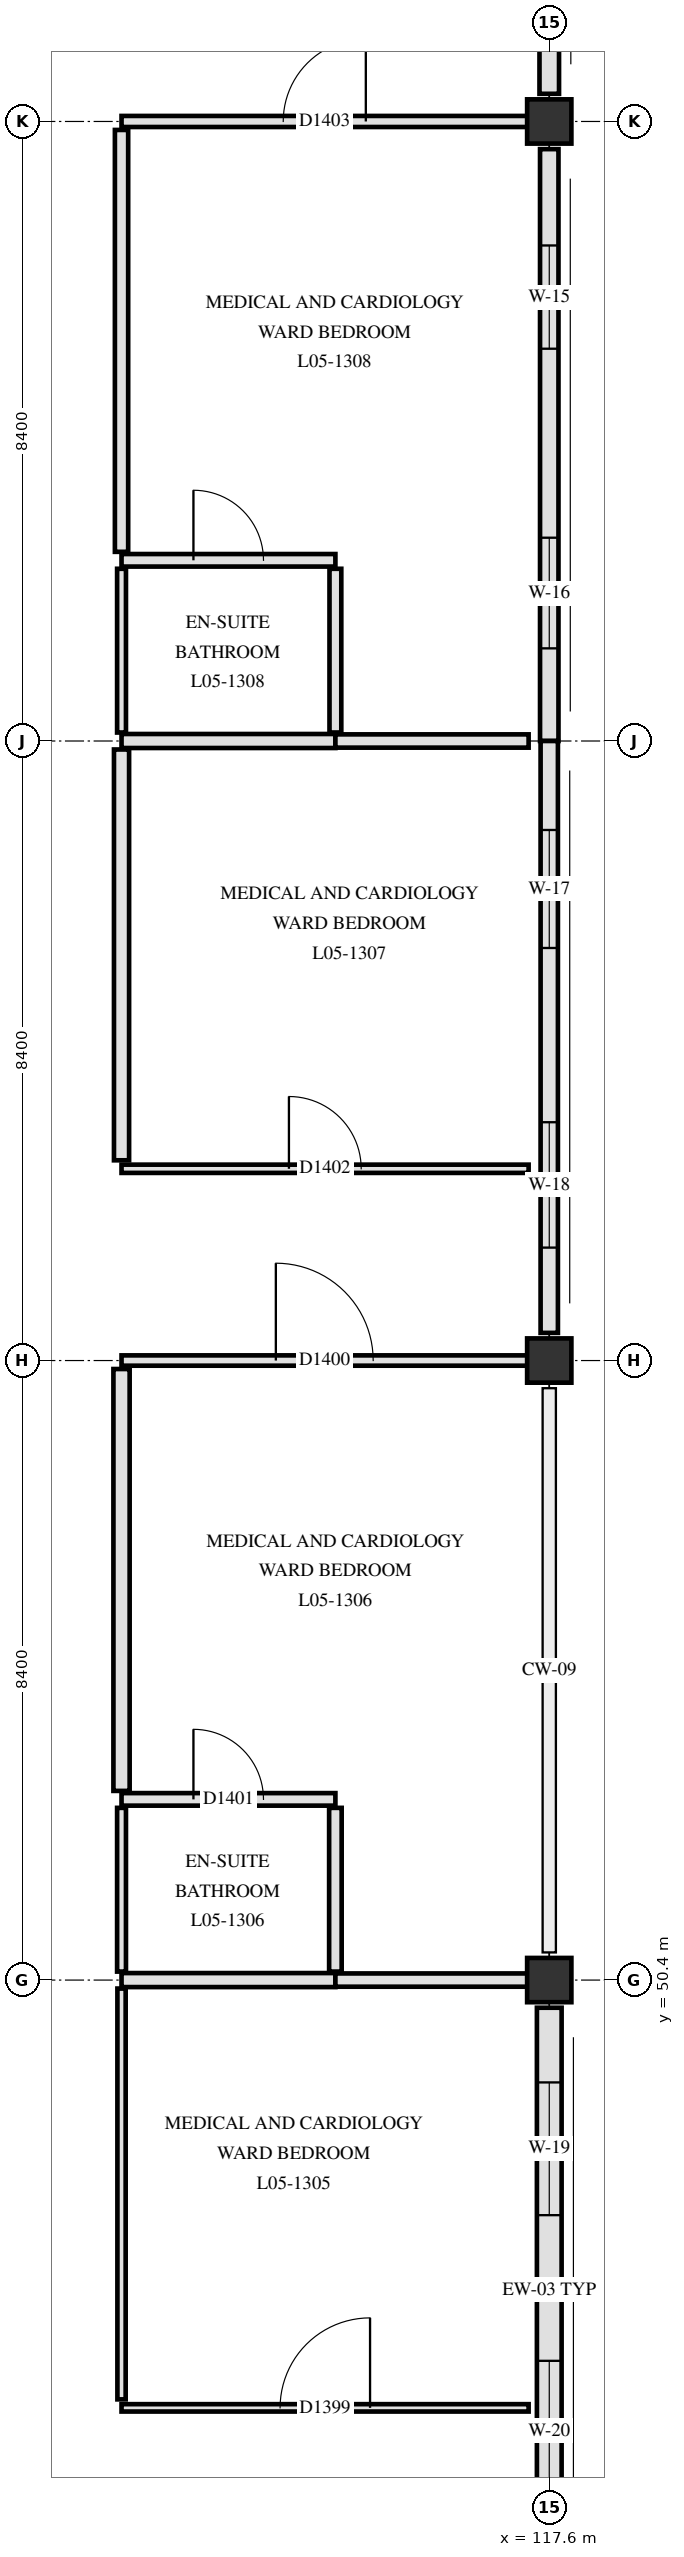
"""IFC4 building model, lengths in metres.
Left out: names, types, materials, properties, quantities, classifications, styles, units other than length and angle.
Written with IfcOpenShell. Run it as: python <this file> out.ifc"""

import sys

from ifc_helpers import new_model, si_unit, direction, frame, frame_2d, origin, origin_2d, place, context, subcontext, project, spatial, rectangle, extrude, element, fill, save


model = new_model("IFC4")
c1 = context("Model", 3, precision=1e-05, world=origin(), true_north=direction((0.0, 1.0)))
c2 = subcontext(c1, "Body", "Model", "MODEL_VIEW")
j1 = project(units=[si_unit("LENGTHUNIT", "METRE"), si_unit("PLANEANGLEUNIT", "RADIAN")], contexts=[c1])
p1 = place(None, origin())
s1 = spatial("IfcSite", under=j1, at=p1, CompositionType="ELEMENT")
p2 = place(p1, origin())
s2 = spatial("IfcBuilding", under=s1, at=p2, CompositionType="ELEMENT")
p3 = place(p2, frame((0.0, 0.0, 22.5)))
s3 = spatial("IfcBuildingStorey", under=s2, at=p3, CompositionType="ELEMENT", Elevation=22.5)
for number, where, z_axis, x_axis in (
    (1, (117.6, 50.4, 0.0), (0.0, 0.0, 1.0), (1.0, 0.0, 0.0)),
    (2, (117.6, 58.8, 0.0), (0.0, 0.0, 1.0), (1.0, 0.0, 0.0)),
    (3, (117.6, 75.6, 0.0), (0.0, 0.0, 1.0), (1.0, 0.0, 0.0)),
):
    element("IfcColumn", number, at=place(p3, frame(where, z_axis=z_axis, x_axis=x_axis)), inside=s3, PredefinedType="COLUMN", context=c2, shape_type="SweptSolid", body=[
        extrude(rectangle(XDim=0.6, YDim=0.6, at=origin_2d()), origin(), (0.0, 0.0, 1.0), 3.9),
    ])
p4 = place(p3, frame((117.6, 83.625, 0.0), z_axis=(0.0, 0.0, 1.0), x_axis=(0.0, -1.0, 0.0)))
e4 = element("IfcWall", 4, at=p4, inside=s3, PredefinedType="SOLIDWALL", context=c2, shape_type="SweptSolid", body=[
    extrude(rectangle(XDim=7.65, YDim=0.265, at=frame_2d((3.825, 0.0))), origin(), (0.0, 0.0, 1.0), 3.38),
])
p5 = place(p4, frame((1.312, 0.0, 0.85)))
e5 = element("IfcOpeningElement", 5, at=p5, cuts=e4, PredefinedType="OPENING", context=c2, shape_type="SweptSolid", body=[
    extrude(rectangle(XDim=1.2, YDim=1.42, at=frame_2d((0.6, 0.71))), frame((0.0, 0.142, 0.0), z_axis=(0.0, -1.0, 0.0), x_axis=(1.0, 0.0, 0.0)), (0.0, 0.0, 1.0), 0.285),
])
p6 = place(p4, frame((5.087, 0.0, 0.85)))
e6 = element("IfcOpeningElement", 6, at=p6, cuts=e4, PredefinedType="OPENING", context=c2, shape_type="SweptSolid", body=[
    extrude(rectangle(XDim=1.3, YDim=1.42, at=frame_2d((0.65, 0.71))), frame((0.0, 0.142, 0.0), z_axis=(0.0, -1.0, 0.0), x_axis=(1.0, 0.0, 0.0)), (0.0, 0.0, 1.0), 0.285),
])
p7 = place(p3, frame((117.6, 75.225, 0.0), z_axis=(0.0, 0.0, 1.0), x_axis=(0.0, -1.0, 0.0)))
e7 = element("IfcWall", 7, at=p7, inside=s3, PredefinedType="SOLIDWALL", context=c2, shape_type="SweptSolid", body=[
    extrude(rectangle(XDim=8.025, YDim=0.25, at=frame_2d((4.013, 0.0))), origin(), (0.0, 0.0, 1.0), 3.11),
])
p8 = place(p7, frame((1.306, 0.0, 0.85)))
e8 = element("IfcOpeningElement", 8, at=p8, cuts=e7, PredefinedType="OPENING", context=c2, shape_type="SweptSolid", body=[
    extrude(rectangle(XDim=1.4, YDim=1.42, at=frame_2d((0.7, 0.71))), frame((0.0, 0.135, 0.0), z_axis=(0.0, -1.0, 0.0), x_axis=(1.0, 0.0, 0.0)), (0.0, 0.0, 1.0), 0.27),
])
p9 = place(p7, frame((5.269, 0.0, 0.85)))
e9 = element("IfcOpeningElement", 9, at=p9, cuts=e7, PredefinedType="OPENING", context=c2, shape_type="SweptSolid", body=[
    extrude(rectangle(XDim=1.5, YDim=1.42, at=frame_2d((0.75, 0.71))), frame((0.0, 0.135, 0.0), z_axis=(0.0, -1.0, 0.0), x_axis=(1.0, 0.0, 0.0)), (0.0, 0.0, 1.0), 0.27),
])
p10 = place(p3, frame((117.6, 67.2, 0.0), z_axis=(0.0, 0.0, 1.0), x_axis=(0.0, -1.0, 0.0)))
e10 = element("IfcWall", 10, at=p10, inside=s3, PredefinedType="SOLIDWALL", context=c2, shape_type="SweptSolid", body=[
    extrude(rectangle(XDim=8.025, YDim=0.235, at=frame_2d((4.012, 0.0))), origin(), (0.0, 0.0, 1.0), 3.11),
])
p11 = place(p10, frame((1.206, 0.0, 0.85)))
e11 = element("IfcOpeningElement", 11, at=p11, cuts=e10, PredefinedType="OPENING", context=c2, shape_type="SweptSolid", body=[
    extrude(rectangle(XDim=1.6, YDim=1.42, at=frame_2d((0.8, 0.71))), frame((0.0, 0.127, 0.0), z_axis=(0.0, -1.0, 0.0), x_axis=(1.0, 0.0, 0.0)), (0.0, 0.0, 1.0), 0.255),
])
p12 = place(p10, frame((5.169, 0.0, 0.85)))
e12 = element("IfcOpeningElement", 12, at=p12, cuts=e10, PredefinedType="OPENING", context=c2, shape_type="SweptSolid", body=[
    extrude(rectangle(XDim=1.7, YDim=1.42, at=frame_2d((0.85, 0.71))), frame((0.0, 0.127, 0.0), z_axis=(0.0, -1.0, 0.0), x_axis=(1.0, 0.0, 0.0)), (0.0, 0.0, 1.0), 0.255),
])
p13 = place(p3, frame((117.6, 50.025, 0.0), z_axis=(0.0, 0.0, 1.0), x_axis=(0.0, -1.0, 0.0)))
e13 = element("IfcWall", 13, at=p13, inside=s3, PredefinedType="SOLIDWALL", context=c2, shape_type="SweptSolid", body=[
    extrude(rectangle(XDim=7.65, YDim=0.335, at=frame_2d((3.825, 0.0))), origin(), (0.0, 0.0, 1.0), 3.34),
])
p14 = place(p13, frame((1.012, 0.0, 0.85)))
e14 = element("IfcOpeningElement", 14, at=p14, cuts=e13, PredefinedType="OPENING", context=c2, shape_type="SweptSolid", body=[
    extrude(rectangle(XDim=1.8, YDim=1.42, at=frame_2d((0.9, 0.71))), frame((0.0, 0.177, 0.0), z_axis=(0.0, -1.0, 0.0), x_axis=(1.0, 0.0, 0.0)), (0.0, 0.0, 1.0), 0.355),
])
p15 = place(p13, frame((4.788, 0.0, 0.85)))
e15 = element("IfcOpeningElement", 15, at=p15, cuts=e13, PredefinedType="OPENING", context=c2, shape_type="SweptSolid", body=[
    extrude(rectangle(XDim=1.9, YDim=1.42, at=frame_2d((0.95, 0.71))), frame((0.0, 0.177, 0.0), z_axis=(0.0, -1.0, 0.0), x_axis=(1.0, 0.0, 0.0)), (0.0, 0.0, 1.0), 0.355),
])
p16 = place(p3, frame((111.8, 44.6, 0.0), z_axis=(0.0, 0.0, 1.0), x_axis=(1.0, 0.0, 0.0)))
e16 = element("IfcWall", 16, at=p16, inside=s3, PredefinedType="PARTITIONING", context=c2, shape_type="SweptSolid", body=[
    extrude(rectangle(XDim=5.52, YDim=0.1, at=frame_2d((2.76, 0.0))), origin(), (0.0, 0.0, 1.0), 3.61),
])
p17 = place(p16, frame((2.15, 0.0, 0.0)))
e17 = element("IfcOpeningElement", 17, at=p17, cuts=e16, PredefinedType="OPENING", context=c2, shape_type="SweptSolid", body=[
    extrude(rectangle(XDim=1.22, YDim=2.18, at=frame_2d((0.61, 1.09))), frame((0.0, 0.06, 0.0), z_axis=(0.0, -1.0, 0.0), x_axis=(1.0, 0.0, 0.0)), (0.0, 0.0, 1.0), 0.12),
])
p18 = place(p3, frame((111.8, 50.4, 0.0), z_axis=(0.0, 0.0, 1.0), x_axis=(1.0, 0.0, 0.0)))
e18 = element("IfcWall", 18, at=p18, inside=s3, PredefinedType="PARTITIONING", context=c2, shape_type="SweptSolid", body=[
    extrude(rectangle(XDim=2.9, YDim=0.19, at=frame_2d((1.45, 0.0))), origin(), (0.0, 0.0, 1.0), 3.16),
])
p19 = place(p3, frame((114.7, 50.4, 0.0), z_axis=(0.0, 0.0, 1.0), x_axis=(1.0, 0.0, 0.0)))
e19 = element("IfcWall", 19, at=p19, inside=s3, PredefinedType="PARTITIONING", context=c2, shape_type="SweptSolid", body=[
    extrude(rectangle(XDim=2.605, YDim=0.18, at=frame_2d((1.302, 0.0))), origin(), (0.0, 0.0, 1.0), 3.16),
])
p20 = place(p3, frame((111.8, 52.85, 0.0), z_axis=(0.0, 0.0, 1.0), x_axis=(1.0, 0.0, 0.0)))
e20 = element("IfcWall", 20, at=p20, inside=s3, PredefinedType="PARTITIONING", context=c2, shape_type="SweptSolid", body=[
    extrude(rectangle(XDim=2.9, YDim=0.17, at=frame_2d((1.45, 0.0))), origin(), (0.0, 0.0, 1.0), 3.61),
])
p21 = place(p20, frame((0.975, 0.0, 0.0)))
e21 = element("IfcOpeningElement", 21, at=p21, cuts=e20, PredefinedType="OPENING", context=c2, shape_type="SweptSolid", body=[
    extrude(rectangle(XDim=0.95, YDim=2.1, at=frame_2d((0.475, 1.05))), frame((0.0, 0.095, 0.0), z_axis=(0.0, -1.0, 0.0), x_axis=(1.0, 0.0, 0.0)), (0.0, 0.0, 1.0), 0.19),
])
p22 = place(p3, frame((111.8, 58.8, 0.0), z_axis=(0.0, 0.0, 1.0), x_axis=(1.0, 0.0, 0.0)))
e22 = element("IfcWall", 22, at=p22, inside=s3, PredefinedType="PARTITIONING", context=c2, shape_type="SweptSolid", body=[
    extrude(rectangle(XDim=5.505, YDim=0.14, at=frame_2d((2.752, 0.0))), origin(), (0.0, 0.0, 1.0), 3.16),
])
p23 = place(p22, frame((2.093, 0.0, 0.0)))
e23 = element("IfcOpeningElement", 23, at=p23, cuts=e22, PredefinedType="OPENING", context=c2, shape_type="SweptSolid", body=[
    extrude(rectangle(XDim=1.32, YDim=2.18, at=frame_2d((0.66, 1.09))), frame((0.0, 0.08, 0.0), z_axis=(0.0, -1.0, 0.0), x_axis=(1.0, 0.0, 0.0)), (0.0, 0.0, 1.0), 0.16),
])
p24 = place(p3, frame((111.8, 61.4, 0.0), z_axis=(0.0, 0.0, 1.0), x_axis=(1.0, 0.0, 0.0)))
e24 = element("IfcWall", 24, at=p24, inside=s3, PredefinedType="PARTITIONING", context=c2, shape_type="SweptSolid", body=[
    extrude(rectangle(XDim=5.52, YDim=0.112, at=frame_2d((2.76, 0.0))), origin(), (0.0, 0.0, 1.0), 3.61),
])
p25 = place(p24, frame((2.27, 0.0, 0.0)))
e25 = element("IfcOpeningElement", 25, at=p25, cuts=e24, PredefinedType="OPENING", context=c2, shape_type="SweptSolid", body=[
    extrude(rectangle(XDim=0.98, YDim=2.12, at=frame_2d((0.49, 1.06))), frame((0.0, 0.066, 0.0), z_axis=(0.0, -1.0, 0.0), x_axis=(1.0, 0.0, 0.0)), (0.0, 0.0, 1.0), 0.132),
])
p26 = place(p3, frame((111.8, 67.2, 0.0), z_axis=(0.0, 0.0, 1.0), x_axis=(1.0, 0.0, 0.0)))
e26 = element("IfcWall", 26, at=p26, inside=s3, PredefinedType="PARTITIONING", context=c2, shape_type="SweptSolid", body=[
    extrude(rectangle(XDim=2.9, YDim=0.19, at=frame_2d((1.45, 0.0))), origin(), (0.0, 0.0, 1.0), 3.61),
])
p27 = place(p3, frame((114.7, 67.2, 0.0), z_axis=(0.0, 0.0, 1.0), x_axis=(1.0, 0.0, 0.0)))
e27 = element("IfcWall", 27, at=p27, inside=s3, PredefinedType="PARTITIONING", context=c2, shape_type="SweptSolid", body=[
    extrude(rectangle(XDim=2.62, YDim=0.18, at=frame_2d((1.31, 0.0))), origin(), (0.0, 0.0, 1.0), 3.61),
])
p28 = place(p3, frame((111.8, 69.65, 0.0), z_axis=(0.0, 0.0, 1.0), x_axis=(1.0, 0.0, 0.0)))
e28 = element("IfcWall", 28, at=p28, inside=s3, PredefinedType="PARTITIONING", context=c2, shape_type="SweptSolid", body=[
    extrude(rectangle(XDim=2.9, YDim=0.17, at=frame_2d((1.45, 0.0))), origin(), (0.0, 0.0, 1.0), 3.61),
])
p29 = place(p28, frame((0.975, 0.0, 0.0)))
e29 = element("IfcOpeningElement", 29, at=p29, cuts=e28, PredefinedType="OPENING", context=c2, shape_type="SweptSolid", body=[
    extrude(rectangle(XDim=0.95, YDim=2.1, at=frame_2d((0.475, 1.05))), frame((0.0, 0.095, 0.0), z_axis=(0.0, -1.0, 0.0), x_axis=(1.0, 0.0, 0.0)), (0.0, 0.0, 1.0), 0.19),
])
p30 = place(p3, frame((111.8, 75.6, 0.0), z_axis=(0.0, 0.0, 1.0), x_axis=(1.0, 0.0, 0.0)))
e30 = element("IfcWall", 30, at=p30, inside=s3, PredefinedType="PARTITIONING", context=c2, shape_type="SweptSolid", body=[
    extrude(rectangle(XDim=5.505, YDim=0.15, at=frame_2d((2.752, 0.0))), origin(), (0.0, 0.0, 1.0), 3.16),
])
p31 = place(p30, frame((2.192, 0.0, 0.0)))
e31 = element("IfcOpeningElement", 31, at=p31, cuts=e30, PredefinedType="OPENING", context=c2, shape_type="SweptSolid", body=[
    extrude(rectangle(XDim=1.12, YDim=2.18, at=frame_2d((0.56, 1.09))), frame((0.0, 0.085, 0.0), z_axis=(0.0, -1.0, 0.0), x_axis=(1.0, 0.0, 0.0)), (0.0, 0.0, 1.0), 0.17),
])
p32 = place(p3, frame((111.8, 44.715, 0.0), z_axis=(0.0, 0.0, 1.0), x_axis=(0.0, 1.0, 0.0)))
e32 = element("IfcWall", 32, at=p32, inside=s3, PredefinedType="PARTITIONING", context=c2, shape_type="SweptSolid", body=[
    extrude(rectangle(XDim=5.57, YDim=0.112, at=frame_2d((2.785, 0.0))), origin(), (0.0, 0.0, 1.0), 3.34),
])
p33 = place(p3, frame((111.8, 50.515, 0.0), z_axis=(0.0, 0.0, 1.0), x_axis=(0.0, 1.0, 0.0)))
e33 = element("IfcWall", 33, at=p33, inside=s3, PredefinedType="PARTITIONING", context=c2, shape_type="SweptSolid", body=[
    extrude(rectangle(XDim=2.22, YDim=0.12, at=frame_2d((1.11, 0.0))), origin(), (0.0, 0.0, 1.0), 3.61),
])
p34 = place(p3, frame((111.8, 52.965, 0.0), z_axis=(0.0, 0.0, 1.0), x_axis=(0.0, 1.0, 0.0)))
e34 = element("IfcWall", 34, at=p34, inside=s3, PredefinedType="PARTITIONING", context=c2, shape_type="SweptSolid", body=[
    extrude(rectangle(XDim=5.72, YDim=0.22, at=frame_2d((2.86, 0.0))), origin(), (0.0, 0.0, 1.0), 3.34),
])
p35 = place(p3, frame((111.8, 61.515, 0.0), z_axis=(0.0, 0.0, 1.0), x_axis=(0.0, 1.0, 0.0)))
e35 = element("IfcWall", 35, at=p35, inside=s3, PredefinedType="PARTITIONING", context=c2, shape_type="SweptSolid", body=[
    extrude(rectangle(XDim=5.57, YDim=0.205, at=frame_2d((2.785, 0.0))), origin(), (0.0, 0.0, 1.0), 3.34),
])
p36 = place(p3, frame((111.8, 67.315, 0.0), z_axis=(0.0, 0.0, 1.0), x_axis=(0.0, 1.0, 0.0)))
e36 = element("IfcWall", 36, at=p36, inside=s3, PredefinedType="PARTITIONING", context=c2, shape_type="SweptSolid", body=[
    extrude(rectangle(XDim=2.22, YDim=0.12, at=frame_2d((1.11, 0.0))), origin(), (0.0, 0.0, 1.0), 3.61),
])
p37 = place(p3, frame((111.8, 69.765, 0.0), z_axis=(0.0, 0.0, 1.0), x_axis=(0.0, 1.0, 0.0)))
e37 = element("IfcWall", 37, at=p37, inside=s3, PredefinedType="PARTITIONING", context=c2, shape_type="SweptSolid", body=[
    extrude(rectangle(XDim=5.72, YDim=0.18, at=frame_2d((2.86, 0.0))), origin(), (0.0, 0.0, 1.0), 3.34),
])
p38 = place(p3, frame((114.7, 50.515, 0.0), z_axis=(0.0, 0.0, 1.0), x_axis=(0.0, 1.0, 0.0)))
e38 = element("IfcWall", 38, at=p38, inside=s3, PredefinedType="PARTITIONING", context=c2, shape_type="SweptSolid", body=[
    extrude(rectangle(XDim=2.22, YDim=0.17, at=frame_2d((1.11, 0.0))), origin(), (0.0, 0.0, 1.0), 3.61),
])
p39 = place(p3, frame((114.7, 67.315, 0.0), z_axis=(0.0, 0.0, 1.0), x_axis=(0.0, 1.0, 0.0)))
e39 = element("IfcWall", 39, at=p39, inside=s3, PredefinedType="PARTITIONING", context=c2, shape_type="SweptSolid", body=[
    extrude(rectangle(XDim=2.22, YDim=0.16, at=frame_2d((1.11, 0.0))), origin(), (0.0, 0.0, 1.0), 3.61),
])
p40 = place(p8, origin())
e40 = element("IfcWindow", 40, at=p40, inside=s3, PartitioningType="SINGLE_PANEL", PredefinedType="WINDOW", context=c2, shape_type="SweptSolid", body=[
    extrude(rectangle(XDim=1.4, YDim=1.42, at=frame_2d((0.7, 0.71))), frame((0.0, 0.03, 0.0), z_axis=(0.0, -1.0, 0.0), x_axis=(1.0, 0.0, 0.0)), (0.0, 0.0, 1.0), 0.06),
])
fill(e8, e40)
p41 = place(p9, origin())
e41 = element("IfcWindow", 41, at=p41, inside=s3, PartitioningType="SINGLE_PANEL", PredefinedType="WINDOW", context=c2, shape_type="SweptSolid", body=[
    extrude(rectangle(XDim=1.5, YDim=1.42, at=frame_2d((0.75, 0.71))), frame((0.0, 0.03, 0.0), z_axis=(0.0, -1.0, 0.0), x_axis=(1.0, 0.0, 0.0)), (0.0, 0.0, 1.0), 0.06),
])
fill(e9, e41)
p42 = place(p11, origin())
e42 = element("IfcWindow", 42, at=p42, inside=s3, PartitioningType="SINGLE_PANEL", PredefinedType="WINDOW", context=c2, shape_type="SweptSolid", body=[
    extrude(rectangle(XDim=1.6, YDim=1.42, at=frame_2d((0.8, 0.71))), frame((0.0, 0.03, 0.0), z_axis=(0.0, -1.0, 0.0), x_axis=(1.0, 0.0, 0.0)), (0.0, 0.0, 1.0), 0.06),
])
fill(e11, e42)
p43 = place(p12, origin())
e43 = element("IfcWindow", 43, at=p43, inside=s3, PartitioningType="SINGLE_PANEL", PredefinedType="WINDOW", context=c2, shape_type="SweptSolid", body=[
    extrude(rectangle(XDim=1.7, YDim=1.42, at=frame_2d((0.85, 0.71))), frame((0.0, 0.03, 0.0), z_axis=(0.0, -1.0, 0.0), x_axis=(1.0, 0.0, 0.0)), (0.0, 0.0, 1.0), 0.06),
])
fill(e12, e43)
p44 = place(p14, origin())
e44 = element("IfcWindow", 44, at=p44, inside=s3, PartitioningType="SINGLE_PANEL", PredefinedType="WINDOW", context=c2, shape_type="SweptSolid", body=[
    extrude(rectangle(XDim=1.8, YDim=1.42, at=frame_2d((0.9, 0.71))), frame((0.0, 0.03, 0.0), z_axis=(0.0, -1.0, 0.0), x_axis=(1.0, 0.0, 0.0)), (0.0, 0.0, 1.0), 0.06),
])
fill(e14, e44)
p45 = place(p15, origin())
e45 = element("IfcWindow", 45, at=p45, inside=s3, PartitioningType="SINGLE_PANEL", PredefinedType="WINDOW", context=c2, shape_type="SweptSolid", body=[
    extrude(rectangle(XDim=1.9, YDim=1.42, at=frame_2d((0.95, 0.71))), frame((0.0, 0.03, 0.0), z_axis=(0.0, -1.0, 0.0), x_axis=(1.0, 0.0, 0.0)), (0.0, 0.0, 1.0), 0.06),
])
fill(e15, e45)
p46 = place(p17, origin())
e46 = element("IfcDoor", 46, at=p46, inside=s3, OperationType="SINGLE_SWING_RIGHT", PredefinedType="DOOR", context=c2, shape_type="SweptSolid", body=[
    extrude(rectangle(XDim=1.22, YDim=2.18, at=frame_2d((0.61, 1.09))), frame((0.0, 0.025, 0.0), z_axis=(0.0, -1.0, 0.0), x_axis=(1.0, 0.0, 0.0)), (0.0, 0.0, 1.0), 0.05),
])
fill(e17, e46)
p47 = place(p23, origin())
e47 = element("IfcDoor", 47, at=p47, inside=s3, OperationType="SINGLE_SWING_LEFT", PredefinedType="DOOR", context=c2, shape_type="SweptSolid", body=[
    extrude(rectangle(XDim=1.32, YDim=2.18, at=frame_2d((0.66, 1.09))), frame((0.0, 0.025, 0.0), z_axis=(0.0, -1.0, 0.0), x_axis=(1.0, 0.0, 0.0)), (0.0, 0.0, 1.0), 0.05),
])
fill(e23, e47)
p48 = place(p21, origin())
e48 = element("IfcDoor", 48, at=p48, inside=s3, OperationType="SINGLE_SWING_LEFT", PredefinedType="DOOR", context=c2, shape_type="SweptSolid", body=[
    extrude(rectangle(XDim=0.95, YDim=2.1, at=frame_2d((0.475, 1.05))), frame((0.0, 0.025, 0.0), z_axis=(0.0, -1.0, 0.0), x_axis=(1.0, 0.0, 0.0)), (0.0, 0.0, 1.0), 0.05),
])
fill(e21, e48)
p49 = place(p25, origin())
e49 = element("IfcDoor", 49, at=p49, inside=s3, OperationType="SINGLE_SWING_LEFT", PredefinedType="DOOR", context=c2, shape_type="SweptSolid", body=[
    extrude(rectangle(XDim=0.98, YDim=2.12, at=frame_2d((0.49, 1.06))), frame((0.0, 0.025, 0.0), z_axis=(0.0, -1.0, 0.0), x_axis=(1.0, 0.0, 0.0)), (0.0, 0.0, 1.0), 0.05),
])
fill(e25, e49)
p50 = place(p31, origin())
e50 = element("IfcDoor", 50, at=p50, inside=s3, OperationType="SINGLE_SWING_RIGHT", PredefinedType="DOOR", context=c2, shape_type="SweptSolid", body=[
    extrude(rectangle(XDim=1.12, YDim=2.18, at=frame_2d((0.56, 1.09))), frame((0.0, 0.025, 0.0), z_axis=(0.0, -1.0, 0.0), x_axis=(1.0, 0.0, 0.0)), (0.0, 0.0, 1.0), 0.05),
])
fill(e31, e50)
p51 = place(p29, origin())
e51 = element("IfcDoor", 51, at=p51, inside=s3, OperationType="SINGLE_SWING_LEFT", PredefinedType="DOOR", context=c2, shape_type="SweptSolid", body=[
    extrude(rectangle(XDim=0.95, YDim=2.1, at=frame_2d((0.475, 1.05))), frame((0.0, 0.025, 0.0), z_axis=(0.0, -1.0, 0.0), x_axis=(1.0, 0.0, 0.0)), (0.0, 0.0, 1.0), 0.05),
])
fill(e29, e51)
save(model, sys.argv[1])
